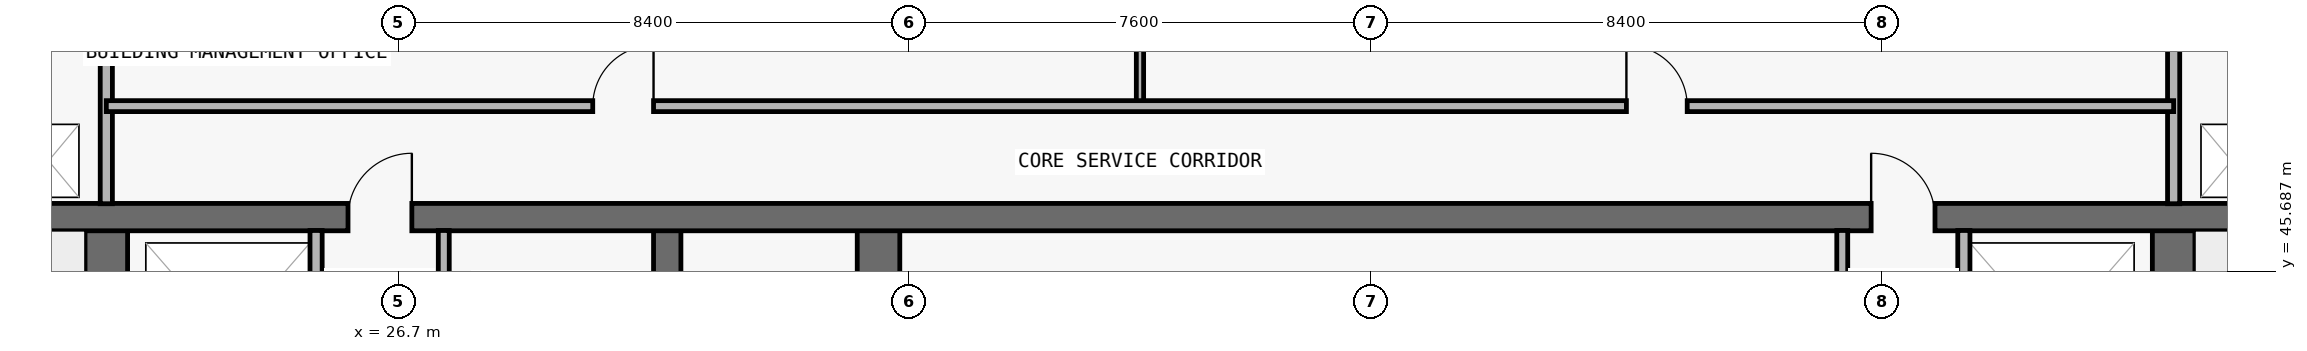
"""IFC4 building model, lengths in metres.
Left out: names, types, materials, properties, quantities, classifications, styles, units other than length and angle.
Written with IfcOpenShell. Run it as: python <this file> out.ifc"""

import sys

from ifc_helpers import new_model, si_unit, direction, frame, frame_2d, origin, place, context, subcontext, project, spatial, rectangle, extrude, element, fill, save


model = new_model("IFC4")
c1 = context("Model", 3, precision=1e-05, world=origin(), true_north=direction((0.0, 1.0)))
c2 = subcontext(c1, "Body", "Model", "MODEL_VIEW")
j1 = project(units=[si_unit("LENGTHUNIT", "METRE"), si_unit("PLANEANGLEUNIT", "RADIAN")], contexts=[c1])
p1 = place(None, origin())
s1 = spatial("IfcSite", under=j1, at=p1, CompositionType="ELEMENT")
p2 = place(p1, origin())
s2 = spatial("IfcBuilding", under=s1, at=p2, CompositionType="ELEMENT")
p3 = place(p2, frame((0.0, 0.0, 279.4)))
s3 = spatial("IfcBuildingStorey", under=s2, at=p3, CompositionType="ELEMENT", Elevation=279.4)
p4 = place(p3, frame((21.9, 37.0, 0.0), z_axis=(0.0, 0.0, 1.0), x_axis=(0.0, 1.0, 0.0)))
e1 = element("IfcWall", 1, at=p4, inside=s3, PredefinedType="SHEAR", context=c2, shape_type="SweptSolid", body=[
    extrude(rectangle(XDim=9.575, YDim=0.7, at=frame_2d((4.788, 0.0))), origin(), (0.0, 0.0, 1.0), 5.1),
])
p5 = place(p4, frame((0.55, 0.0, 0.0)))
e2 = element("IfcOpeningElement", 2, at=p5, cuts=e1, PredefinedType="OPENING", context=c2, shape_type="SweptSolid", body=[
    extrude(rectangle(XDim=1.1, YDim=2.15, at=frame_2d((0.55, 1.075))), frame((0.0, 0.36, 0.0), z_axis=(0.0, -1.0, 0.0), x_axis=(1.0, 0.0, 0.0)), (0.0, 0.0, 1.0), 0.72),
])
p6 = place(p3, frame((55.9, 37.0, 0.0), z_axis=(0.0, 0.0, 1.0), x_axis=(0.0, 1.0, 0.0)))
e3 = element("IfcWall", 3, at=p6, inside=s3, PredefinedType="SHEAR", context=c2, shape_type="SweptSolid", body=[
    extrude(rectangle(XDim=9.575, YDim=0.7, at=frame_2d((4.788, 0.0))), origin(), (0.0, 0.0, 1.0), 5.1),
])
p7 = place(p6, frame((0.55, 0.0, 0.0)))
e4 = element("IfcOpeningElement", 4, at=p7, cuts=e3, PredefinedType="OPENING", context=c2, shape_type="SweptSolid", body=[
    extrude(rectangle(XDim=1.1, YDim=2.15, at=frame_2d((0.55, 1.075))), frame((0.0, 0.36, 0.0), z_axis=(0.0, -1.0, 0.0), x_axis=(1.0, 0.0, 0.0)), (0.0, 0.0, 1.0), 0.72),
])
p8 = place(p3, frame((31.125, 37.0, 0.0), z_axis=(0.0, 0.0, 1.0), x_axis=(0.0, 1.0, 0.0)))
e5 = element("IfcWall", 5, at=p8, inside=s3, PredefinedType="SHEAR", context=c2, shape_type="SweptSolid", body=[
    extrude(rectangle(XDim=9.575, YDim=0.45, at=frame_2d((4.788, 0.0))), origin(), (0.0, 0.0, 1.0), 5.1),
])
p9 = place(p3, frame((34.6, 37.0, 0.0), z_axis=(0.0, 0.0, 1.0), x_axis=(0.0, 1.0, 0.0)))
e6 = element("IfcWall", 6, at=p9, inside=s3, PredefinedType="SHEAR", context=c2, shape_type="SweptSolid", body=[
    extrude(rectangle(XDim=9.575, YDim=0.7, at=frame_2d((4.788, 0.0))), origin(), (0.0, 0.0, 1.0), 5.1),
])
p10 = place(p3, frame((18.3, 46.575, 0.0), z_axis=(0.0, 0.0, 1.0), x_axis=(1.0, 0.0, 0.0)))
e7 = element("IfcWall", 7, at=p10, inside=s3, PredefinedType="SHEAR", context=c2, shape_type="SweptSolid", body=[
    extrude(rectangle(XDim=41.2, YDim=0.45, at=frame_2d((20.6, 0.0))), origin(), (0.0, 0.0, 1.0), 5.1),
])
p11 = place(p10, frame((7.575, 0.0, 0.0)))
e8 = element("IfcOpeningElement", 8, at=p11, cuts=e7, PredefinedType="OPENING", context=c2, shape_type="SweptSolid", body=[
    extrude(rectangle(XDim=1.05, YDim=2.15, at=frame_2d((0.525, 1.075))), frame((0.0, 0.235, 0.0), z_axis=(0.0, -1.0, 0.0), x_axis=(1.0, 0.0, 0.0)), (0.0, 0.0, 1.0), 0.47),
])
p12 = place(p10, frame((32.625, 0.0, 0.0)))
e9 = element("IfcOpeningElement", 9, at=p12, cuts=e7, PredefinedType="OPENING", context=c2, shape_type="SweptSolid", body=[
    extrude(rectangle(XDim=1.05, YDim=2.15, at=frame_2d((0.525, 1.075))), frame((0.0, 0.235, 0.0), z_axis=(0.0, -1.0, 0.0), x_axis=(1.0, 0.0, 0.0)), (0.0, 0.0, 1.0), 0.47),
])
p13 = place(p3, frame((21.9, 46.795, 0.0), z_axis=(0.0, 0.0, 1.0), x_axis=(0.0, 1.0, 0.0)))
e10 = element("IfcWall", 10, at=p13, inside=s3, PredefinedType="PARTITIONING", context=c2, shape_type="SweptSolid", body=[
    extrude(rectangle(XDim=3.16, YDim=0.2, at=frame_2d((1.58, 0.0))), origin(), (0.0, 0.0, 1.0), 5.1),
])
p14 = place(p3, frame((25.35, 43.17, 0.0), z_axis=(0.0, 0.0, 1.0), x_axis=(0.0, 1.0, 0.0)))
e11 = element("IfcWall", 11, at=p14, inside=s3, PredefinedType="PARTITIONING", context=c2, shape_type="SweptSolid", body=[
    extrude(rectangle(XDim=3.185, YDim=0.2, at=frame_2d((1.593, 0.0))), origin(), (0.0, 0.0, 1.0), 5.1),
])
p15 = place(p3, frame((27.45, 43.17, 0.0), z_axis=(0.0, 0.0, 1.0), x_axis=(0.0, 1.0, 0.0)))
e12 = element("IfcWall", 12, at=p15, inside=s3, PredefinedType="PARTITIONING", context=c2, shape_type="SweptSolid", body=[
    extrude(rectangle(XDim=3.185, YDim=0.18, at=frame_2d((1.593, 0.0))), origin(), (0.0, 0.0, 1.0), 5.1),
])
p16 = place(p3, frame((38.9, 48.4, 0.0), z_axis=(0.0, 0.0, 1.0), x_axis=(0.0, 1.0, 0.0)))
e13 = element("IfcWall", 13, at=p16, inside=s3, PredefinedType="PARTITIONING", context=c2, shape_type="SweptSolid", body=[
    extrude(rectangle(XDim=1.555, YDim=0.12, at=frame_2d((0.778, 0.0))), origin(), (0.0, 0.0, 1.0), 5.1),
])
p17 = place(p3, frame((50.45, 43.17, 0.0), z_axis=(0.0, 0.0, 1.0), x_axis=(0.0, 1.0, 0.0)))
e14 = element("IfcWall", 14, at=p17, inside=s3, PredefinedType="PARTITIONING", context=c2, shape_type="SweptSolid", body=[
    extrude(rectangle(XDim=3.185, YDim=0.18, at=frame_2d((1.593, 0.0))), origin(), (0.0, 0.0, 1.0), 5.1),
])
p18 = place(p3, frame((52.45, 43.17, 0.0), z_axis=(0.0, 0.0, 1.0), x_axis=(0.0, 1.0, 0.0)))
e15 = element("IfcWall", 15, at=p18, inside=s3, PredefinedType="PARTITIONING", context=c2, shape_type="SweptSolid", body=[
    extrude(rectangle(XDim=3.185, YDim=0.2, at=frame_2d((1.593, 0.0))), origin(), (0.0, 0.0, 1.0), 5.1),
])
p19 = place(p3, frame((55.9, 46.795, 0.0), z_axis=(0.0, 0.0, 1.0), x_axis=(0.0, 1.0, 0.0)))
e16 = element("IfcWall", 16, at=p19, inside=s3, PredefinedType="PARTITIONING", context=c2, shape_type="SweptSolid", body=[
    extrude(rectangle(XDim=3.16, YDim=0.2, at=frame_2d((1.58, 0.0))), origin(), (0.0, 0.0, 1.0), 5.1),
])
p20 = place(p3, frame((21.9, 48.4, 0.0), z_axis=(0.0, 0.0, 1.0), x_axis=(1.0, 0.0, 0.0)))
e17 = element("IfcWall", 17, at=p20, inside=s3, PredefinedType="PARTITIONING", context=c2, shape_type="SweptSolid", body=[
    extrude(rectangle(XDim=34.0, YDim=0.18, at=frame_2d((17.0, 0.0))), origin(), (0.0, 0.0, 1.0), 5.1),
])
p21 = place(p20, frame((8.0, 0.0, 0.0)))
e18 = element("IfcOpeningElement", 18, at=p21, cuts=e17, PredefinedType="OPENING", context=c2, shape_type="SweptSolid", body=[
    extrude(rectangle(XDim=1.0, YDim=2.2, at=frame_2d((0.5, 1.1))), frame((0.0, 0.1, 0.0), z_axis=(0.0, -1.0, 0.0), x_axis=(1.0, 0.0, 0.0)), (0.0, 0.0, 1.0), 0.2),
])
p22 = place(p20, frame((25.0, 0.0, 0.0)))
e19 = element("IfcOpeningElement", 19, at=p22, cuts=e17, PredefinedType="OPENING", context=c2, shape_type="SweptSolid", body=[
    extrude(rectangle(XDim=1.0, YDim=2.2, at=frame_2d((0.5, 1.1))), frame((0.0, 0.1, 0.0), z_axis=(0.0, -1.0, 0.0), x_axis=(1.0, 0.0, 0.0)), (0.0, 0.0, 1.0), 0.2),
])
p23 = place(p11, origin())
e20 = element("IfcDoor", 20, at=p23, inside=s3, OperationType="SINGLE_SWING_RIGHT", PredefinedType="DOOR", context=c2, shape_type="SweptSolid", body=[
    extrude(rectangle(XDim=1.05, YDim=2.15, at=frame_2d((0.525, 1.075))), frame((0.0, 0.025, 0.0), z_axis=(0.0, -1.0, 0.0), x_axis=(1.0, 0.0, 0.0)), (0.0, 0.0, 1.0), 0.05),
])
fill(e8, e20)
p24 = place(p12, origin())
e21 = element("IfcDoor", 21, at=p24, inside=s3, OperationType="SINGLE_SWING_LEFT", PredefinedType="DOOR", context=c2, shape_type="SweptSolid", body=[
    extrude(rectangle(XDim=1.05, YDim=2.15, at=frame_2d((0.525, 1.075))), frame((0.0, 0.025, 0.0), z_axis=(0.0, -1.0, 0.0), x_axis=(1.0, 0.0, 0.0)), (0.0, 0.0, 1.0), 0.05),
])
fill(e9, e21)
p25 = place(p21, origin())
e22 = element("IfcDoor", 22, at=p25, inside=s3, OperationType="SINGLE_SWING_RIGHT", PredefinedType="DOOR", context=c2, shape_type="SweptSolid", body=[
    extrude(rectangle(XDim=1.0, YDim=2.2, at=frame_2d((0.5, 1.1))), frame((0.0, 0.025, 0.0), z_axis=(0.0, -1.0, 0.0), x_axis=(1.0, 0.0, 0.0)), (0.0, 0.0, 1.0), 0.05),
])
fill(e18, e22)
p26 = place(p22, origin())
e23 = element("IfcDoor", 23, at=p26, inside=s3, OperationType="SINGLE_SWING_LEFT", PredefinedType="DOOR", context=c2, shape_type="SweptSolid", body=[
    extrude(rectangle(XDim=1.0, YDim=2.2, at=frame_2d((0.5, 1.1))), frame((0.0, 0.025, 0.0), z_axis=(0.0, -1.0, 0.0), x_axis=(1.0, 0.0, 0.0)), (0.0, 0.0, 1.0), 0.05),
])
fill(e19, e23)
save(model, sys.argv[1])
